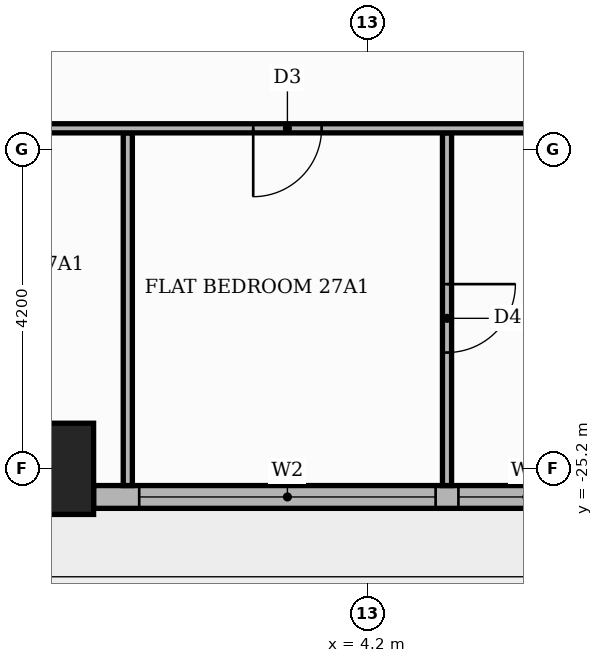
"""IFC4 building model, lengths in metres.
Left out: names, types, materials, properties, quantities, classifications, styles, units other than length and angle.
Written with IfcOpenShell. Run it as: python <this file> out.ifc"""

import sys

from ifc_helpers import new_model, si_unit, direction, frame, frame_2d, origin, origin_2d, place, context, subcontext, project, spatial, rectangle, extrude, element, fill, save


model = new_model("IFC4")
c1 = context("Model", 3, precision=1e-05, world=origin(), true_north=direction((0.0, 1.0)))
c2 = subcontext(c1, "Body", "Model", "MODEL_VIEW")
j1 = project(units=[si_unit("LENGTHUNIT", "METRE"), si_unit("PLANEANGLEUNIT", "RADIAN")], contexts=[c1])
p1 = place(None, origin())
s1 = spatial("IfcSite", under=j1, at=p1, CompositionType="ELEMENT")
p2 = place(p1, origin())
s2 = spatial("IfcBuilding", under=s1, at=p2, CompositionType="ELEMENT")
p3 = place(p2, frame((0.0, 0.0, 114.3)))
s3 = spatial("IfcBuildingStorey", under=s2, at=p3, CompositionType="ELEMENT", Elevation=114.3)
p4 = place(p3, frame((0.0, -25.2, 0.0), z_axis=(0.0, 0.0, 1.0), x_axis=(1.0, 0.0, 0.0)))
e1 = element("IfcColumn", 1, at=p4, inside=s3, PredefinedType="COLUMN", context=c2, shape_type="SweptSolid", body=[
    extrude(rectangle(XDim=1.2, YDim=1.2, at=origin_2d()), origin(), (0.0, 0.0, 1.0), 3.9),
])
p5 = place(p3, frame((0.6, -25.57, 0.0), z_axis=(0.0, 0.0, 1.0), x_axis=(1.0, 0.0, 0.0)))
e2 = element("IfcWall", 2, at=p5, inside=s3, PredefinedType="STANDARD", context=c2, shape_type="SweptSolid", body=[
    extrude(rectangle(XDim=7.2, YDim=0.3, at=frame_2d((3.6, 0.0))), origin(), (0.0, 0.0, 1.0), 3.48),
])
p6 = place(p5, frame((0.6, 0.0, 0.9)))
e3 = element("IfcOpeningElement", 3, at=p6, cuts=e2, PredefinedType="OPENING", context=c2, shape_type="SweptSolid", body=[
    extrude(rectangle(XDim=3.9, YDim=2.1, at=frame_2d((1.95, 1.05))), frame((0.0, 0.16, 0.0), z_axis=(0.0, -1.0, 0.0), x_axis=(1.0, 0.0, 0.0)), (0.0, 0.0, 1.0), 0.32),
])
p7 = place(p5, frame((4.8, 0.0, 0.9)))
e4 = element("IfcOpeningElement", 4, at=p7, cuts=e2, PredefinedType="OPENING", context=c2, shape_type="SweptSolid", body=[
    extrude(rectangle(XDim=1.8, YDim=2.1, at=frame_2d((0.9, 1.05))), frame((0.0, 0.16, 0.0), z_axis=(0.0, -1.0, 0.0), x_axis=(1.0, 0.0, 0.0)), (0.0, 0.0, 1.0), 0.32),
])
p8 = place(p3, frame((1.05, -25.42, 0.0), z_axis=(0.0, 0.0, 1.0), x_axis=(0.0, 1.0, 0.0)))
e5 = element("IfcWall", 5, at=p8, inside=s3, PredefinedType="PARTITIONING", context=c2, shape_type="SweptSolid", body=[
    extrude(rectangle(XDim=4.64, YDim=0.12, at=frame_2d((2.32, 0.0))), origin(), (0.0, 0.0, 1.0), 3.48),
])
p9 = place(p3, frame((5.25, -25.42, 0.0), z_axis=(0.0, 0.0, 1.0), x_axis=(0.0, 1.0, 0.0)))
e6 = element("IfcWall", 6, at=p9, inside=s3, PredefinedType="PARTITIONING", context=c2, shape_type="SweptSolid", body=[
    extrude(rectangle(XDim=4.64, YDim=0.12, at=frame_2d((2.32, 0.0))), origin(), (0.0, 0.0, 1.0), 3.48),
])
p10 = place(p9, frame((1.75, 0.0, 0.0)))
e7 = element("IfcOpeningElement", 7, at=p10, cuts=e6, PredefinedType="OPENING", context=c2, shape_type="SweptSolid", body=[
    extrude(rectangle(XDim=0.9, YDim=2.1, at=frame_2d((0.45, 1.05))), frame((0.0, 0.07, 0.0), z_axis=(0.0, -1.0, 0.0), x_axis=(1.0, 0.0, 0.0)), (0.0, 0.0, 1.0), 0.14),
])
p11 = place(p3, frame((-25.42, -20.72, 0.0), z_axis=(0.0, 0.0, 1.0), x_axis=(1.0, 0.0, 0.0)))
e8 = element("IfcWall", 8, at=p11, inside=s3, PredefinedType="PARTITIONING", context=c2, shape_type="SweptSolid", body=[
    extrude(rectangle(XDim=38.97, YDim=0.12, at=frame_2d((19.485, 0.0))), origin(), (0.0, 0.0, 1.0), 3.48),
])
p12 = place(p11, frame((10.22, 0.0, 0.0)))
e9 = element("IfcOpeningElement", 9, at=p12, cuts=e8, PredefinedType="OPENING", context=c2, shape_type="SweptSolid", body=[
    extrude(rectangle(XDim=1.0, YDim=2.1, at=frame_2d((0.5, 1.05))), frame((0.0, 0.07, 0.0), z_axis=(0.0, -1.0, 0.0), x_axis=(1.0, 0.0, 0.0)), (0.0, 0.0, 1.0), 0.14),
])
p13 = place(p11, frame((14.47, 0.0, 0.0)))
e10 = element("IfcOpeningElement", 10, at=p13, cuts=e8, PredefinedType="OPENING", context=c2, shape_type="SweptSolid", body=[
    extrude(rectangle(XDim=0.9, YDim=2.1, at=frame_2d((0.45, 1.05))), frame((0.0, 0.07, 0.0), z_axis=(0.0, -1.0, 0.0), x_axis=(1.0, 0.0, 0.0)), (0.0, 0.0, 1.0), 0.14),
])
p14 = place(p11, frame((23.92, 0.0, 0.0)))
e11 = element("IfcOpeningElement", 11, at=p14, cuts=e8, PredefinedType="OPENING", context=c2, shape_type="SweptSolid", body=[
    extrude(rectangle(XDim=0.9, YDim=2.1, at=frame_2d((0.45, 1.05))), frame((0.0, 0.07, 0.0), z_axis=(0.0, -1.0, 0.0), x_axis=(1.0, 0.0, 0.0)), (0.0, 0.0, 1.0), 0.14),
])
p15 = place(p11, frame((28.12, 0.0, 0.0)))
e12 = element("IfcOpeningElement", 12, at=p15, cuts=e8, PredefinedType="OPENING", context=c2, shape_type="SweptSolid", body=[
    extrude(rectangle(XDim=0.9, YDim=2.1, at=frame_2d((0.45, 1.05))), frame((0.0, 0.07, 0.0), z_axis=(0.0, -1.0, 0.0), x_axis=(1.0, 0.0, 0.0)), (0.0, 0.0, 1.0), 0.14),
])
p16 = place(p11, frame((34.42, 0.0, 0.0)))
e13 = element("IfcOpeningElement", 13, at=p16, cuts=e8, PredefinedType="OPENING", context=c2, shape_type="SweptSolid", body=[
    extrude(rectangle(XDim=0.9, YDim=2.1, at=frame_2d((0.45, 1.05))), frame((0.0, 0.07, 0.0), z_axis=(0.0, -1.0, 0.0), x_axis=(1.0, 0.0, 0.0)), (0.0, 0.0, 1.0), 0.14),
])
p17 = place(p6, origin())
e14 = element("IfcWindow", 14, at=p17, inside=s3, PartitioningType="SINGLE_PANEL", PredefinedType="WINDOW", context=c2, shape_type="SweptSolid", body=[
    extrude(rectangle(XDim=3.9, YDim=2.1, at=frame_2d((1.95, 1.05))), frame((0.0, 0.03, 0.0), z_axis=(0.0, -1.0, 0.0), x_axis=(1.0, 0.0, 0.0)), (0.0, 0.0, 1.0), 0.06),
])
fill(e3, e14)
p18 = place(p7, origin())
e15 = element("IfcWindow", 15, at=p18, inside=s3, PartitioningType="SINGLE_PANEL", PredefinedType="WINDOW", context=c2, shape_type="SweptSolid", body=[
    extrude(rectangle(XDim=1.8, YDim=2.1, at=frame_2d((0.9, 1.05))), frame((0.0, 0.03, 0.0), z_axis=(0.0, -1.0, 0.0), x_axis=(1.0, 0.0, 0.0)), (0.0, 0.0, 1.0), 0.06),
])
fill(e4, e15)
p19 = place(p15, frame((0.9, 0.0, 0.0), z_axis=(0.0, 0.0, 1.0), x_axis=(-1.0, 0.0, 0.0)))
e16 = element("IfcDoor", 16, at=p19, inside=s3, OperationType="SINGLE_SWING_LEFT", PredefinedType="DOOR", context=c2, shape_type="SweptSolid", body=[
    extrude(rectangle(XDim=0.9, YDim=2.1, at=frame_2d((0.45, 1.05))), frame((0.0, 0.025, 0.0), z_axis=(0.0, -1.0, 0.0), x_axis=(1.0, 0.0, 0.0)), (0.0, 0.0, 1.0), 0.05),
])
fill(e12, e16)
p20 = place(p10, frame((0.9, 0.0, 0.0), z_axis=(0.0, 0.0, 1.0), x_axis=(-1.0, 0.0, 0.0)))
e17 = element("IfcDoor", 17, at=p20, inside=s3, OperationType="SINGLE_SWING_RIGHT", PredefinedType="DOOR", context=c2, shape_type="SweptSolid", body=[
    extrude(rectangle(XDim=0.9, YDim=2.1, at=frame_2d((0.45, 1.05))), frame((0.0, 0.025, 0.0), z_axis=(0.0, -1.0, 0.0), x_axis=(1.0, 0.0, 0.0)), (0.0, 0.0, 1.0), 0.05),
])
fill(e7, e17)
save(model, sys.argv[1])
